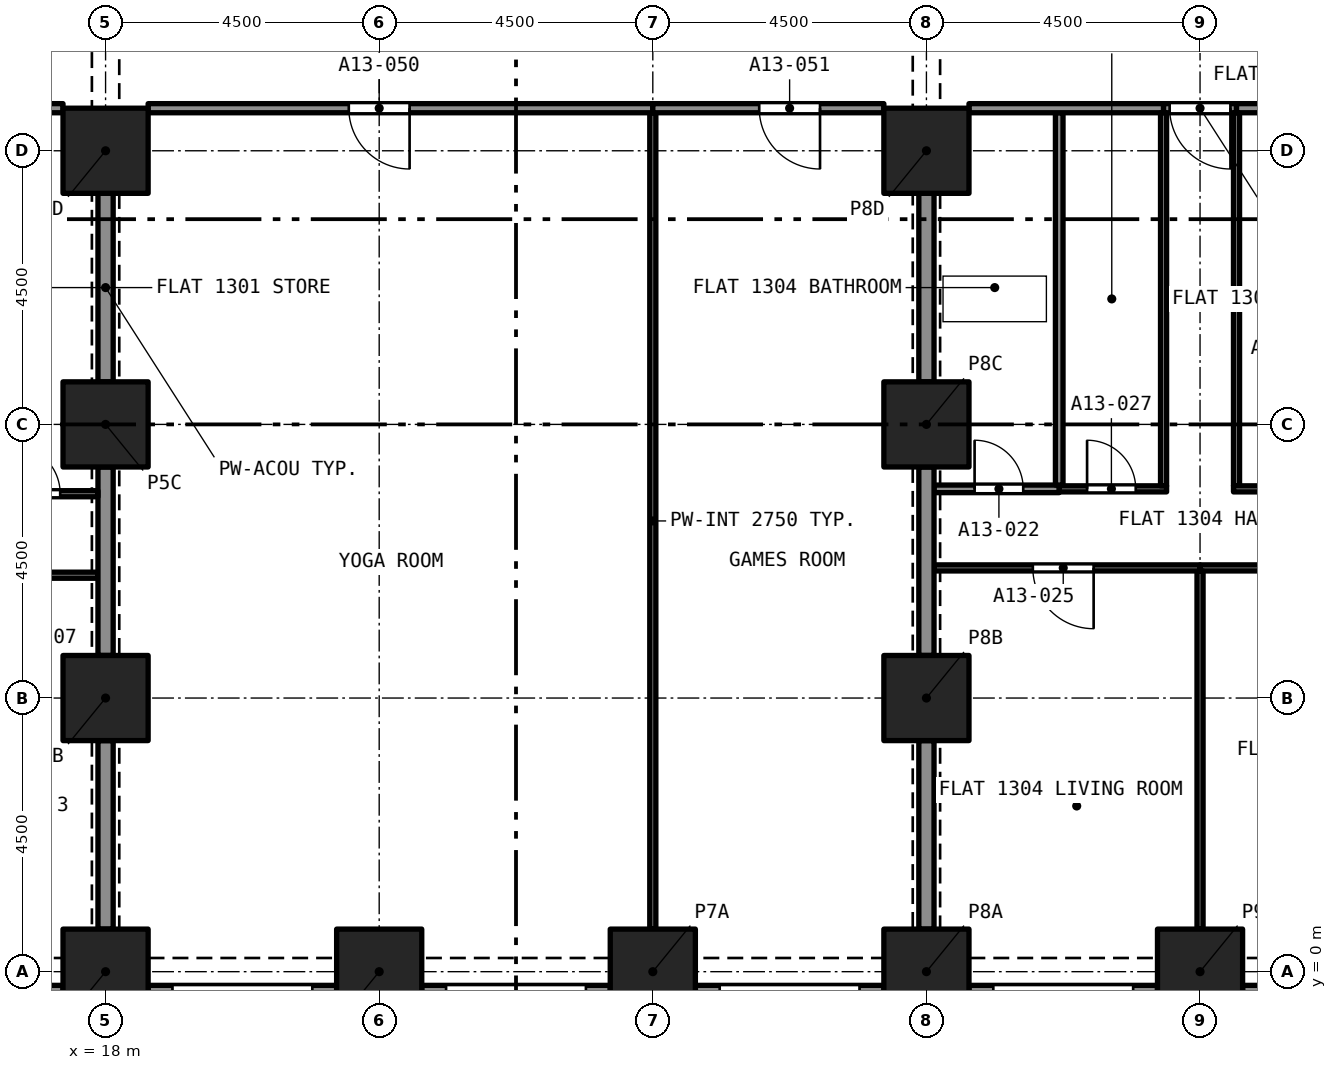
"""IFC4 building model, lengths in metres.
Left out: names, types, materials, properties, quantities, classifications, styles, units other than length and angle.
Written with IfcOpenShell. Run it as: python <this file> out.ifc"""

import sys

from ifc_helpers import new_model, si_unit, direction, frame, frame_2d, origin, origin_2d, place, context, subcontext, project, spatial, rectangle, extrude, element, fill, save


model = new_model("IFC4")
c1 = context("Model", 3, precision=1e-05, world=origin(), true_north=direction((0.0, 1.0)))
c2 = subcontext(c1, "Body", "Model", "MODEL_VIEW")
j1 = project(units=[si_unit("LENGTHUNIT", "METRE"), si_unit("PLANEANGLEUNIT", "RADIAN")], contexts=[c1])
p1 = place(None, origin())
s1 = spatial("IfcSite", under=j1, at=p1, CompositionType="ELEMENT")
p2 = place(p1, origin())
s2 = spatial("IfcBuilding", under=s1, at=p2, CompositionType="ELEMENT")
p3 = place(p2, frame((0.0, 0.0, 52.8)))
s3 = spatial("IfcBuildingStorey", under=s2, at=p3, CompositionType="ELEMENT", Elevation=52.8)
for number, where, z_axis, x_axis in (
    (1, (18.0, 0.0, 0.0), (0.0, 0.0, 1.0), (1.0, 0.0, 0.0)),
    (2, (22.5, 0.0, 0.0), (0.0, 0.0, 1.0), (1.0, 0.0, 0.0)),
    (3, (27.0, 0.0, 0.0), (0.0, 0.0, 1.0), (1.0, 0.0, 0.0)),
    (4, (31.5, 0.0, 0.0), (0.0, 0.0, 1.0), (1.0, 0.0, 0.0)),
    (5, (36.0, 0.0, 0.0), (0.0, 0.0, 1.0), (1.0, 0.0, 0.0)),
    (6, (18.0, 4.5, 0.0), (0.0, 0.0, 1.0), (1.0, 0.0, 0.0)),
    (7, (31.5, 4.5, 0.0), (0.0, 0.0, 1.0), (1.0, 0.0, 0.0)),
    (8, (18.0, 9.0, 0.0), (0.0, 0.0, 1.0), (1.0, 0.0, 0.0)),
    (9, (31.5, 9.0, 0.0), (0.0, 0.0, 1.0), (1.0, 0.0, 0.0)),
    (10, (18.0, 13.5, 0.0), (0.0, 0.0, 1.0), (1.0, 0.0, 0.0)),
    (11, (31.5, 13.5, 0.0), (0.0, 0.0, 1.0), (1.0, 0.0, 0.0)),
):
    element("IfcColumn", number, at=place(p3, frame(where, z_axis=z_axis, x_axis=x_axis)), inside=s3, PredefinedType="COLUMN", context=c2, shape_type="SweptSolid", body=[
        extrude(rectangle(XDim=1.4, YDim=1.4, at=origin_2d()), origin(), (0.0, 0.0, 1.0), 3.2),
    ])
p4 = place(p3, frame((17.3, -0.375, 0.0), z_axis=(0.0, 0.0, 1.0), x_axis=(-1.0, 0.0, 0.0)))
e12 = element("IfcWall", 12, at=p4, inside=s3, PredefinedType="SOLIDWALL", context=c2, shape_type="SweptSolid", body=[
    extrude(rectangle(XDim=3.1, YDim=0.3, at=frame_2d((1.55, 0.0))), origin(), (0.0, 0.0, 1.0), 3.2),
])
p5 = place(p4, frame((0.4, 0.0, 0.45)))
e13 = element("IfcOpeningElement", 13, at=p5, cuts=e12, PredefinedType="OPENING", context=c2, shape_type="SweptSolid", body=[
    extrude(rectangle(XDim=2.3, YDim=1.95, at=frame_2d((1.15, 0.975))), frame((0.0, 0.16, 0.0), z_axis=(0.0, -1.0, 0.0), x_axis=(1.0, 0.0, 0.0)), (0.0, 0.0, 1.0), 0.32),
])
p6 = place(p3, frame((21.8, -0.375, 0.0), z_axis=(0.0, 0.0, 1.0), x_axis=(-1.0, 0.0, 0.0)))
e14 = element("IfcWall", 14, at=p6, inside=s3, PredefinedType="SOLIDWALL", context=c2, shape_type="SweptSolid", body=[
    extrude(rectangle(XDim=3.1, YDim=0.3, at=frame_2d((1.55, 0.0))), origin(), (0.0, 0.0, 1.0), 3.2),
])
p7 = place(p6, frame((0.4, 0.0, 0.45)))
e15 = element("IfcOpeningElement", 15, at=p7, cuts=e14, PredefinedType="OPENING", context=c2, shape_type="SweptSolid", body=[
    extrude(rectangle(XDim=2.3, YDim=1.95, at=frame_2d((1.15, 0.975))), frame((0.0, 0.16, 0.0), z_axis=(0.0, -1.0, 0.0), x_axis=(1.0, 0.0, 0.0)), (0.0, 0.0, 1.0), 0.32),
])
p8 = place(p3, frame((26.3, -0.375, 0.0), z_axis=(0.0, 0.0, 1.0), x_axis=(-1.0, 0.0, 0.0)))
e16 = element("IfcWall", 16, at=p8, inside=s3, PredefinedType="SOLIDWALL", context=c2, shape_type="SweptSolid", body=[
    extrude(rectangle(XDim=3.1, YDim=0.3, at=frame_2d((1.55, 0.0))), origin(), (0.0, 0.0, 1.0), 3.2),
])
p9 = place(p8, frame((0.4, 0.0, 0.45)))
e17 = element("IfcOpeningElement", 17, at=p9, cuts=e16, PredefinedType="OPENING", context=c2, shape_type="SweptSolid", body=[
    extrude(rectangle(XDim=2.3, YDim=1.95, at=frame_2d((1.15, 0.975))), frame((0.0, 0.16, 0.0), z_axis=(0.0, -1.0, 0.0), x_axis=(1.0, 0.0, 0.0)), (0.0, 0.0, 1.0), 0.32),
])
p10 = place(p3, frame((30.8, -0.375, 0.0), z_axis=(0.0, 0.0, 1.0), x_axis=(-1.0, 0.0, 0.0)))
e18 = element("IfcWall", 18, at=p10, inside=s3, PredefinedType="SOLIDWALL", context=c2, shape_type="SweptSolid", body=[
    extrude(rectangle(XDim=3.1, YDim=0.3, at=frame_2d((1.55, 0.0))), origin(), (0.0, 0.0, 1.0), 3.2),
])
p11 = place(p10, frame((0.4, 0.0, 0.45)))
e19 = element("IfcOpeningElement", 19, at=p11, cuts=e18, PredefinedType="OPENING", context=c2, shape_type="SweptSolid", body=[
    extrude(rectangle(XDim=2.3, YDim=1.95, at=frame_2d((1.15, 0.975))), frame((0.0, 0.16, 0.0), z_axis=(0.0, -1.0, 0.0), x_axis=(1.0, 0.0, 0.0)), (0.0, 0.0, 1.0), 0.32),
])
p12 = place(p3, frame((35.3, -0.375, 0.0), z_axis=(0.0, 0.0, 1.0), x_axis=(-1.0, 0.0, 0.0)))
e20 = element("IfcWall", 20, at=p12, inside=s3, PredefinedType="SOLIDWALL", context=c2, shape_type="SweptSolid", body=[
    extrude(rectangle(XDim=3.1, YDim=0.3, at=frame_2d((1.55, 0.0))), origin(), (0.0, 0.0, 1.0), 3.2),
])
p13 = place(p12, frame((0.4, 0.0, 0.45)))
e21 = element("IfcOpeningElement", 21, at=p13, cuts=e20, PredefinedType="OPENING", context=c2, shape_type="SweptSolid", body=[
    extrude(rectangle(XDim=2.3, YDim=1.95, at=frame_2d((1.15, 0.975))), frame((0.0, 0.16, 0.0), z_axis=(0.0, -1.0, 0.0), x_axis=(1.0, 0.0, 0.0)), (0.0, 0.0, 1.0), 0.32),
])
p14 = place(p3, frame((39.8, -0.375, 0.0), z_axis=(0.0, 0.0, 1.0), x_axis=(-1.0, 0.0, 0.0)))
e22 = element("IfcWall", 22, at=p14, inside=s3, PredefinedType="SOLIDWALL", context=c2, shape_type="SweptSolid", body=[
    extrude(rectangle(XDim=3.1, YDim=0.3, at=frame_2d((1.55, 0.0))), origin(), (0.0, 0.0, 1.0), 3.2),
])
p15 = place(p14, frame((0.4, 0.0, 0.45)))
e23 = element("IfcOpeningElement", 23, at=p15, cuts=e22, PredefinedType="OPENING", context=c2, shape_type="SweptSolid", body=[
    extrude(rectangle(XDim=2.3, YDim=1.95, at=frame_2d((1.15, 0.975))), frame((0.0, 0.16, 0.0), z_axis=(0.0, -1.0, 0.0), x_axis=(1.0, 0.0, 0.0)), (0.0, 0.0, 1.0), 0.32),
])
p16 = place(p3, frame((17.875, 6.52, 0.0), z_axis=(0.0, 0.0, 1.0), x_axis=(-1.0, 0.0, 0.0)))
e24 = element("IfcWall", 24, at=p16, inside=s3, PredefinedType="PARTITIONING", context=c2, shape_type="SweptSolid", body=[
    extrude(rectangle(XDim=4.375, YDim=0.1, at=frame_2d((2.188, 0.0))), origin(), (0.0, 0.0, 1.0), 2.9),
])
p17 = place(p16, frame((1.675, 0.0, 0.0)))
e25 = element("IfcOpeningElement", 25, at=p17, cuts=e24, PredefinedType="OPENING", context=c2, shape_type="SweptSolid", body=[
    extrude(rectangle(XDim=0.9, YDim=2.1, at=frame_2d((0.45, 1.05))), frame((0.0, 0.06, 0.0), z_axis=(0.0, -1.0, 0.0), x_axis=(1.0, 0.0, 0.0)), (0.0, 0.0, 1.0), 0.12),
])
for number, where, z_axis, x_axis in (
    (26, (18.0, 5.2, 0.0), (0.0, 0.0, 1.0), (0.0, 1.0, 0.0)),
    (27, (18.0, 0.7, 0.0), (0.0, 0.0, 1.0), (0.0, 1.0, 0.0)),
):
    element("IfcWall", number, at=place(p3, frame(where, z_axis=z_axis, x_axis=x_axis)), inside=s3, PredefinedType="PARTITIONING", context=c2, shape_type="SweptSolid", body=[
        extrude(rectangle(XDim=3.1, YDim=0.25, at=frame_2d((1.55, 0.0))), origin(), (0.0, 0.0, 1.0), 2.38),
    ])
p18 = place(p3, frame((16.107, 7.86, 0.0), z_axis=(0.0, 0.0, 1.0), x_axis=(1.0, 0.0, 0.0)))
e28 = element("IfcWall", 28, at=p18, inside=s3, PredefinedType="PARTITIONING", context=c2, shape_type="SweptSolid", body=[
    extrude(rectangle(XDim=1.768, YDim=0.1, at=frame_2d((0.884, 0.0))), origin(), (0.0, 0.0, 1.0), 2.9),
])
p19 = place(p18, frame((0.346, 0.0, 0.0)))
e29 = element("IfcOpeningElement", 29, at=p19, cuts=e28, PredefinedType="OPENING", context=c2, shape_type="SweptSolid", body=[
    extrude(rectangle(XDim=0.8, YDim=2.1, at=frame_2d((0.4, 1.05))), frame((0.0, 0.06, 0.0), z_axis=(0.0, -1.0, 0.0), x_axis=(1.0, 0.0, 0.0)), (0.0, 0.0, 1.0), 0.12),
])
p20 = place(p3, frame((11.85, 14.2, 0.0), z_axis=(0.0, 0.0, 1.0), x_axis=(1.0, 0.0, 0.0)))
e30 = element("IfcWall", 30, at=p20, inside=s3, PredefinedType="PARTITIONING", context=c2, shape_type="SweptSolid", body=[
    extrude(rectangle(XDim=5.45, YDim=0.15, at=frame_2d((2.725, 0.0))), origin(), (0.0, 0.0, 1.0), 2.9),
])
p21 = place(p3, frame((18.0, 9.7, 0.0), z_axis=(0.0, 0.0, 1.0), x_axis=(0.0, 1.0, 0.0)))
e31 = element("IfcWall", 31, at=p21, inside=s3, PredefinedType="PARTITIONING", context=c2, shape_type="SweptSolid", body=[
    extrude(rectangle(XDim=3.1, YDim=0.25, at=frame_2d((1.55, 0.0))), origin(), (0.0, 0.0, 1.0), 2.38),
])
p22 = place(p3, frame((31.625, 7.94, 0.0), z_axis=(0.0, 0.0, 1.0), x_axis=(1.0, 0.0, 0.0)))
e32 = element("IfcWall", 32, at=p22, inside=s3, PredefinedType="PARTITIONING", context=c2, shape_type="SweptSolid", body=[
    extrude(rectangle(XDim=2.059, YDim=0.125, at=frame_2d((1.03, 0.0))), origin(), (0.0, 0.0, 1.0), 2.9),
])
p23 = place(p22, frame((0.667, 0.0, 0.0)))
e33 = element("IfcOpeningElement", 33, at=p23, cuts=e32, PredefinedType="OPENING", context=c2, shape_type="SweptSolid", body=[
    extrude(rectangle(XDim=0.8, YDim=2.1, at=frame_2d((0.4, 1.05))), frame((0.0, 0.073, 0.0), z_axis=(0.0, -1.0, 0.0), x_axis=(1.0, 0.0, 0.0)), (0.0, 0.0, 1.0), 0.145),
])
p24 = place(p3, frame((33.684, 8.002, 0.0), z_axis=(0.0, 0.0, 1.0), x_axis=(0.0, 1.0, 0.0)))
e34 = element("IfcWall", 34, at=p24, inside=s3, PredefinedType="PARTITIONING", context=c2, shape_type="SweptSolid", body=[
    extrude(rectangle(XDim=6.123, YDim=0.125, at=frame_2d((3.061, 0.0))), origin(), (0.0, 0.0, 1.0), 2.9),
])
p25 = place(p3, frame((31.5, 9.7, 0.0), z_axis=(0.0, 0.0, 1.0), x_axis=(0.0, 1.0, 0.0)))
e35 = element("IfcWall", 35, at=p25, inside=s3, PredefinedType="PARTITIONING", context=c2, shape_type="SweptSolid", body=[
    extrude(rectangle(XDim=3.1, YDim=0.25, at=frame_2d((1.55, 0.0))), origin(), (0.0, 0.0, 1.0), 2.38),
])
p26 = place(p3, frame((32.2, 14.2, 0.0), z_axis=(0.0, 0.0, 1.0), x_axis=(1.0, 0.0, 0.0)))
e36 = element("IfcWall", 36, at=p26, inside=s3, PredefinedType="PARTITIONING", context=c2, shape_type="SweptSolid", body=[
    extrude(rectangle(XDim=3.2, YDim=0.15, at=frame_2d((1.6, 0.0))), origin(), (0.0, 0.0, 1.0), 2.9),
])
p27 = place(p3, frame((40.4, 6.64, 0.0), z_axis=(0.0, 0.0, 1.0), x_axis=(-1.0, 0.0, 0.0)))
e37 = element("IfcWall", 37, at=p27, inside=s3, PredefinedType="PARTITIONING", context=c2, shape_type="SweptSolid", body=[
    extrude(rectangle(XDim=4.4, YDim=0.1, at=frame_2d((2.2, 0.0))), origin(), (0.0, 0.0, 1.0), 2.9),
])
p28 = place(p27, frame((1.7, 0.0, 0.0)))
e38 = element("IfcOpeningElement", 38, at=p28, cuts=e37, PredefinedType="OPENING", context=c2, shape_type="SweptSolid", body=[
    extrude(rectangle(XDim=0.9, YDim=2.1, at=frame_2d((0.45, 1.05))), frame((0.0, 0.06, 0.0), z_axis=(0.0, -1.0, 0.0), x_axis=(1.0, 0.0, 0.0)), (0.0, 0.0, 1.0), 0.12),
])
p29 = place(p3, frame((36.0, 0.7, 0.0), z_axis=(0.0, 0.0, 1.0), x_axis=(0.0, 1.0, 0.0)))
e39 = element("IfcWall", 39, at=p29, inside=s3, PredefinedType="PARTITIONING", context=c2, shape_type="SweptSolid", body=[
    extrude(rectangle(XDim=5.89, YDim=0.1, at=frame_2d((2.945, 0.0))), origin(), (0.0, 0.0, 1.0), 2.9),
])
p30 = place(p3, frame((36.6, 7.99, 0.0), z_axis=(0.0, 0.0, 1.0), x_axis=(0.0, 1.0, 0.0)))
e40 = element("IfcWall", 40, at=p30, inside=s3, PredefinedType="PARTITIONING", context=c2, shape_type="SweptSolid", body=[
    extrude(rectangle(XDim=6.135, YDim=0.1, at=frame_2d((3.067, 0.0))), origin(), (0.0, 0.0, 1.0), 2.9),
])
p31 = place(p3, frame((36.55, 7.94, 0.0), z_axis=(0.0, 0.0, 1.0), x_axis=(1.0, 0.0, 0.0)))
e41 = element("IfcWall", 41, at=p31, inside=s3, PredefinedType="PARTITIONING", context=c2, shape_type="SweptSolid", body=[
    extrude(rectangle(XDim=2.549, YDim=0.1, at=frame_2d((1.275, 0.0))), origin(), (0.0, 0.0, 1.0), 2.9),
])
p32 = place(p31, frame((0.85, 0.0, 0.0)))
e42 = element("IfcOpeningElement", 42, at=p32, cuts=e41, PredefinedType="OPENING", context=c2, shape_type="SweptSolid", body=[
    extrude(rectangle(XDim=0.9, YDim=2.1, at=frame_2d((0.45, 1.05))), frame((0.0, 0.06, 0.0), z_axis=(0.0, -1.0, 0.0), x_axis=(1.0, 0.0, 0.0)), (0.0, 0.0, 1.0), 0.12),
])
p33 = place(p3, frame((36.0, 6.64, 0.0), z_axis=(0.0, 0.0, 1.0), x_axis=(-1.0, 0.0, 0.0)))
e43 = element("IfcWall", 43, at=p33, inside=s3, PredefinedType="PARTITIONING", context=c2, shape_type="SweptSolid", body=[
    extrude(rectangle(XDim=4.375, YDim=0.1, at=frame_2d((2.188, 0.0))), origin(), (0.0, 0.0, 1.0), 2.9),
])
p34 = place(p33, frame((1.75, 0.0, 0.0)))
e44 = element("IfcOpeningElement", 44, at=p34, cuts=e43, PredefinedType="OPENING", context=c2, shape_type="SweptSolid", body=[
    extrude(rectangle(XDim=1.0, YDim=2.1, at=frame_2d((0.5, 1.05))), frame((0.0, 0.06, 0.0), z_axis=(0.0, -1.0, 0.0), x_axis=(1.0, 0.0, 0.0)), (0.0, 0.0, 1.0), 0.12),
])
p35 = place(p3, frame((33.684, 7.94, 0.0), z_axis=(0.0, 0.0, 1.0), x_axis=(1.0, 0.0, 0.0)))
e45 = element("IfcWall", 45, at=p35, inside=s3, PredefinedType="PARTITIONING", context=c2, shape_type="SweptSolid", body=[
    extrude(rectangle(XDim=1.766, YDim=0.1, at=frame_2d((0.883, 0.0))), origin(), (0.0, 0.0, 1.0), 2.9),
])
p36 = place(p35, frame((0.458, 0.0, 0.0)))
e46 = element("IfcOpeningElement", 46, at=p36, cuts=e45, PredefinedType="OPENING", context=c2, shape_type="SweptSolid", body=[
    extrude(rectangle(XDim=0.8, YDim=2.1, at=frame_2d((0.4, 1.05))), frame((0.0, 0.06, 0.0), z_axis=(0.0, -1.0, 0.0), x_axis=(1.0, 0.0, 0.0)), (0.0, 0.0, 1.0), 0.12),
])
p37 = place(p3, frame((35.4, 7.99, 0.0), z_axis=(0.0, 0.0, 1.0), x_axis=(0.0, 1.0, 0.0)))
e47 = element("IfcWall", 47, at=p37, inside=s3, PredefinedType="PARTITIONING", context=c2, shape_type="SweptSolid", body=[
    extrude(rectangle(XDim=6.135, YDim=0.1, at=frame_2d((3.067, 0.0))), origin(), (0.0, 0.0, 1.0), 2.9),
])
p38 = place(p3, frame((36.6, 14.2, 0.0), z_axis=(0.0, 0.0, 1.0), x_axis=(-1.0, 0.0, 0.0)))
e48 = element("IfcWall", 48, at=p38, inside=s3, PredefinedType="PARTITIONING", context=c2, shape_type="SweptSolid", body=[
    extrude(rectangle(XDim=1.2, YDim=0.15, at=frame_2d((0.6, 0.0))), origin(), (0.0, 0.0, 1.0), 2.9),
])
p39 = place(p38, frame((0.1, 0.0, 0.0)))
e49 = element("IfcOpeningElement", 49, at=p39, cuts=e48, PredefinedType="OPENING", context=c2, shape_type="SweptSolid", body=[
    extrude(rectangle(XDim=1.0, YDim=2.1, at=frame_2d((0.5, 1.05))), frame((0.0, 0.085, 0.0), z_axis=(0.0, -1.0, 0.0), x_axis=(1.0, 0.0, 0.0)), (0.0, 0.0, 1.0), 0.17),
])
p40 = place(p3, frame((36.6, 14.2, 0.0), z_axis=(0.0, 0.0, 1.0), x_axis=(1.0, 0.0, 0.0)))
e50 = element("IfcWall", 50, at=p40, inside=s3, PredefinedType="PARTITIONING", context=c2, shape_type="SweptSolid", body=[
    extrude(rectangle(XDim=3.9, YDim=0.15, at=frame_2d((1.95, 0.0))), origin(), (0.0, 0.0, 1.0), 2.9),
])
for number, where, z_axis, x_axis in (
    (51, (31.5, 0.7, 0.0), (0.0, 0.0, 1.0), (0.0, 1.0, 0.0)),
    (52, (31.5, 5.2, 0.0), (0.0, 0.0, 1.0), (0.0, 1.0, 0.0)),
):
    element("IfcWall", number, at=place(p3, frame(where, z_axis=z_axis, x_axis=x_axis)), inside=s3, PredefinedType="PARTITIONING", context=c2, shape_type="SweptSolid", body=[
        extrude(rectangle(XDim=3.1, YDim=0.25, at=frame_2d((1.55, 0.0))), origin(), (0.0, 0.0, 1.0), 2.38),
    ])
p41 = place(p3, frame((27.0, 0.7, 0.0), z_axis=(0.0, 0.0, 1.0), x_axis=(0.0, 1.0, 0.0)))
e53 = element("IfcWall", 53, at=p41, inside=s3, PredefinedType="PARTITIONING", context=c2, shape_type="SweptSolid", body=[
    extrude(rectangle(XDim=13.425, YDim=0.1, at=frame_2d((6.712, 0.0))), origin(), (0.0, 0.0, 1.0), 2.75),
])
p42 = place(p3, frame((27.0, 14.2, 0.0), z_axis=(0.0, 0.0, 1.0), x_axis=(-1.0, 0.0, 0.0)))
e54 = element("IfcWall", 54, at=p42, inside=s3, PredefinedType="PARTITIONING", context=c2, shape_type="SweptSolid", body=[
    extrude(rectangle(XDim=8.3, YDim=0.15, at=frame_2d((4.15, 0.0))), origin(), (0.0, 0.0, 1.0), 2.75),
])
p43 = place(p42, frame((4.0, 0.0, 0.0)))
e55 = element("IfcOpeningElement", 55, at=p43, cuts=e54, PredefinedType="OPENING", context=c2, shape_type="SweptSolid", body=[
    extrude(rectangle(XDim=1.0, YDim=2.1, at=frame_2d((0.5, 1.05))), frame((0.0, 0.085, 0.0), z_axis=(0.0, -1.0, 0.0), x_axis=(1.0, 0.0, 0.0)), (0.0, 0.0, 1.0), 0.17),
])
p44 = place(p3, frame((30.8, 14.2, 0.0), z_axis=(0.0, 0.0, 1.0), x_axis=(-1.0, 0.0, 0.0)))
e56 = element("IfcWall", 56, at=p44, inside=s3, PredefinedType="PARTITIONING", context=c2, shape_type="SweptSolid", body=[
    extrude(rectangle(XDim=3.8, YDim=0.15, at=frame_2d((1.9, 0.0))), origin(), (0.0, 0.0, 1.0), 2.75),
])
p45 = place(p44, frame((1.05, 0.0, 0.0)))
e57 = element("IfcOpeningElement", 57, at=p45, cuts=e56, PredefinedType="OPENING", context=c2, shape_type="SweptSolid", body=[
    extrude(rectangle(XDim=1.0, YDim=2.1, at=frame_2d((0.5, 1.05))), frame((0.0, 0.085, 0.0), z_axis=(0.0, -1.0, 0.0), x_axis=(1.0, 0.0, 0.0)), (0.0, 0.0, 1.0), 0.17),
])
p46 = place(p19, origin())
e58 = element("IfcDoor", 58, at=p46, inside=s3, OperationType="SINGLE_SWING_LEFT", PredefinedType="DOOR", context=c2, shape_type="SweptSolid", body=[
    extrude(rectangle(XDim=0.8, YDim=2.1, at=frame_2d((0.4, 1.05))), frame((0.0, 0.025, 0.0), z_axis=(0.0, -1.0, 0.0), x_axis=(1.0, 0.0, 0.0)), (0.0, 0.0, 1.0), 0.05),
])
fill(e29, e58)
p47 = place(p23, origin())
e59 = element("IfcDoor", 59, at=p47, inside=s3, OperationType="SINGLE_SWING_RIGHT", PredefinedType="DOOR", context=c2, shape_type="SweptSolid", body=[
    extrude(rectangle(XDim=0.8, YDim=2.1, at=frame_2d((0.4, 1.05))), frame((0.0, 0.025, 0.0), z_axis=(0.0, -1.0, 0.0), x_axis=(1.0, 0.0, 0.0)), (0.0, 0.0, 1.0), 0.05),
])
fill(e33, e59)
p48 = place(p34, origin())
e60 = element("IfcDoor", 60, at=p48, inside=s3, OperationType="SINGLE_SWING_RIGHT", PredefinedType="DOOR", context=c2, shape_type="SweptSolid", body=[
    extrude(rectangle(XDim=1.0, YDim=2.1, at=frame_2d((0.5, 1.05))), frame((0.0, 0.025, 0.0), z_axis=(0.0, -1.0, 0.0), x_axis=(1.0, 0.0, 0.0)), (0.0, 0.0, 1.0), 0.05),
])
fill(e44, e60)
p49 = place(p36, origin())
e61 = element("IfcDoor", 61, at=p49, inside=s3, OperationType="SINGLE_SWING_LEFT", PredefinedType="DOOR", context=c2, shape_type="SweptSolid", body=[
    extrude(rectangle(XDim=0.8, YDim=2.1, at=frame_2d((0.4, 1.05))), frame((0.0, 0.025, 0.0), z_axis=(0.0, -1.0, 0.0), x_axis=(1.0, 0.0, 0.0)), (0.0, 0.0, 1.0), 0.05),
])
fill(e46, e61)
p50 = place(p39, origin())
e62 = element("IfcDoor", 62, at=p50, inside=s3, OperationType="SINGLE_SWING_RIGHT", PredefinedType="DOOR", context=c2, shape_type="SweptSolid", body=[
    extrude(rectangle(XDim=1.0, YDim=2.1, at=frame_2d((0.5, 1.05))), frame((0.0, 0.025, 0.0), z_axis=(0.0, -1.0, 0.0), x_axis=(1.0, 0.0, 0.0)), (0.0, 0.0, 1.0), 0.05),
])
fill(e49, e62)
p51 = place(p43, origin())
e63 = element("IfcDoor", 63, at=p51, inside=s3, OperationType="SINGLE_SWING_RIGHT", PredefinedType="DOOR", context=c2, shape_type="SweptSolid", body=[
    extrude(rectangle(XDim=1.0, YDim=2.1, at=frame_2d((0.5, 1.05))), frame((0.0, 0.025, 0.0), z_axis=(0.0, -1.0, 0.0), x_axis=(1.0, 0.0, 0.0)), (0.0, 0.0, 1.0), 0.05),
])
fill(e55, e63)
p52 = place(p45, origin())
e64 = element("IfcDoor", 64, at=p52, inside=s3, OperationType="SINGLE_SWING_LEFT", PredefinedType="DOOR", context=c2, shape_type="SweptSolid", body=[
    extrude(rectangle(XDim=1.0, YDim=2.1, at=frame_2d((0.5, 1.05))), frame((0.0, 0.025, 0.0), z_axis=(0.0, -1.0, 0.0), x_axis=(1.0, 0.0, 0.0)), (0.0, 0.0, 1.0), 0.05),
])
fill(e57, e64)
save(model, sys.argv[1])
